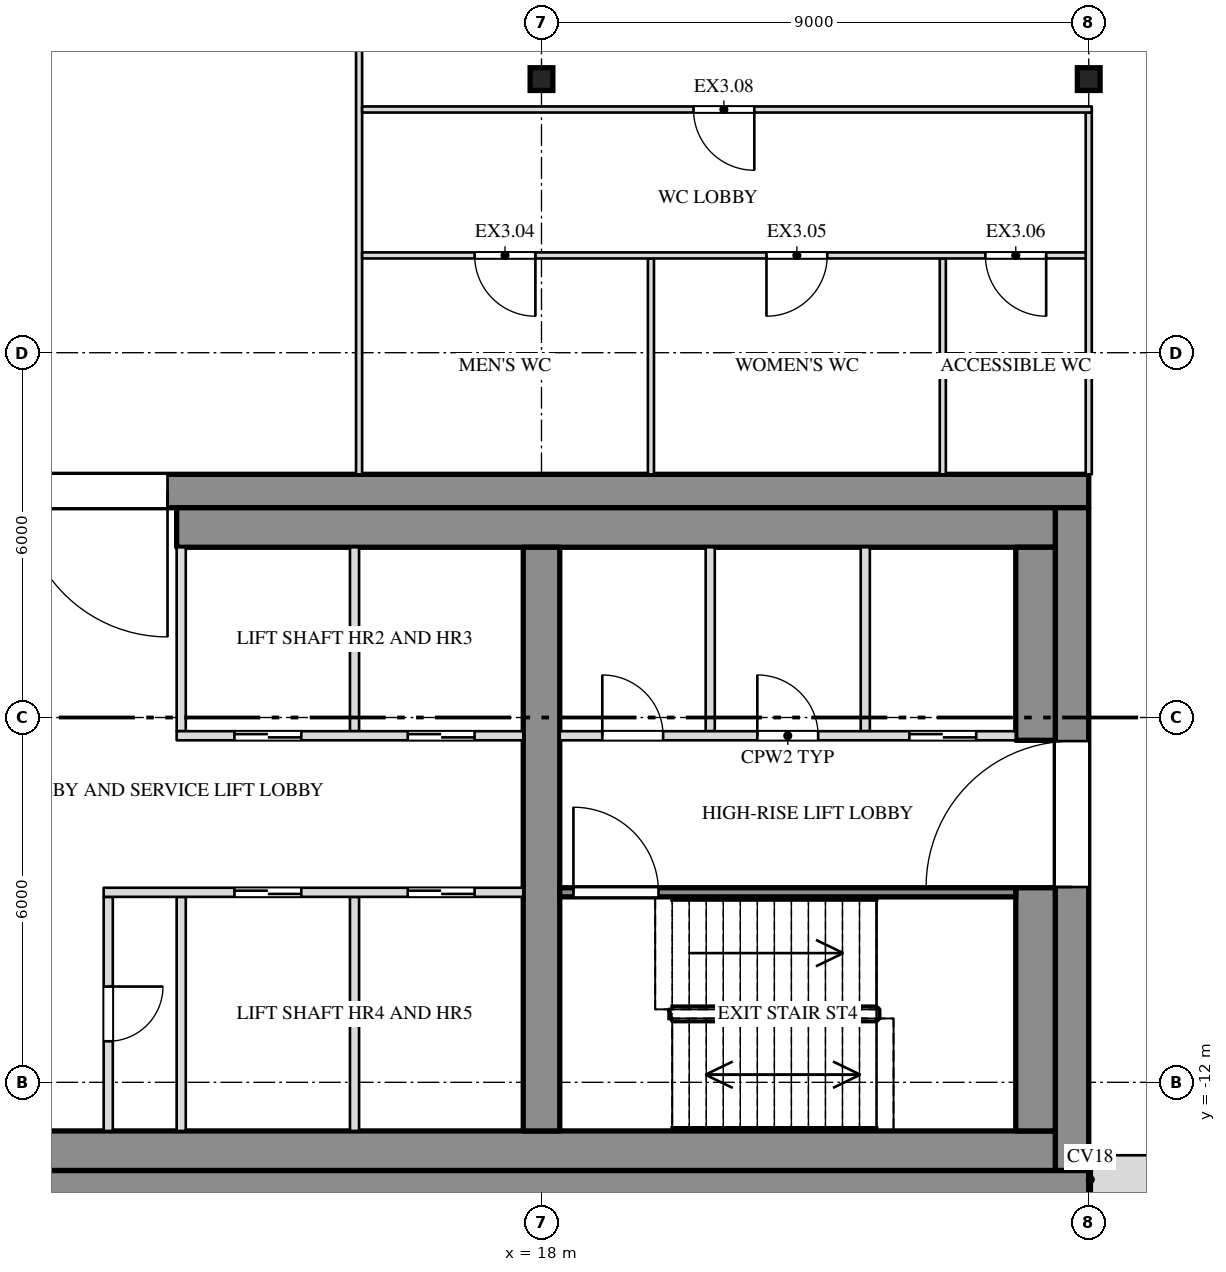
"""IFC4 building model, lengths in metres.
Left out: names, types, materials, properties, quantities, classifications, styles, units other than length and angle.
Written with IfcOpenShell. Run it as: python <this file> out.ifc"""

import sys

from ifc_helpers import new_model, si_unit, direction, frame, frame_2d, origin, origin_2d, place, context, subcontext, project, spatial, rectangle, i_section, extrude, element, fill, save


model = new_model("IFC4")
c1 = context("Model", 3, precision=1e-05, world=origin(), true_north=direction((0.0, 1.0)))
c2 = subcontext(c1, "Body", "Model", "MODEL_VIEW")
j1 = project(units=[si_unit("LENGTHUNIT", "METRE"), si_unit("PLANEANGLEUNIT", "RADIAN")], contexts=[c1])
p1 = place(None, origin())
s1 = spatial("IfcSite", under=j1, at=p1, CompositionType="ELEMENT")
p2 = place(p1, origin())
s2 = spatial("IfcBuilding", under=s1, at=p2, CompositionType="ELEMENT")
p3 = place(p2, frame((0.0, 0.0, 280.5)))
s3 = spatial("IfcBuildingStorey", under=s2, at=p3, CompositionType="ELEMENT", Elevation=280.5)
for number, where, z_axis, x_axis in (
    (1, (18.0, 4.5, 0.0), (0.0, 0.0, 1.0), (1.0, 0.0, 0.0)),
    (2, (27.0, 4.5, 0.0), (0.0, 0.0, 1.0), (1.0, 0.0, 0.0)),
):
    element("IfcColumn", number, at=place(p3, frame(where, z_axis=z_axis, x_axis=x_axis)), inside=s3, PredefinedType="COLUMN", context=c2, shape_type="SweptSolid", body=[
        extrude(i_section(OverallWidth=0.373, OverallDepth=0.373, WebThickness=0.016, FlangeThickness=0.026, at=origin_2d()), origin(), (0.0, 0.0, 1.0), 4.0),
    ])
p4 = place(p3, frame((-27.0, -2.275, 0.0), z_axis=(0.0, 0.0, 1.0), x_axis=(1.0, 0.0, 0.0)))
e3 = element("IfcWall", 3, at=p4, inside=s3, PredefinedType="SHEAR", context=c2, shape_type="SweptSolid", body=[
    extrude(rectangle(XDim=54.0, YDim=0.55, at=frame_2d((27.0, 0.0))), origin(), (0.0, 0.0, 1.0), 3.78),
])
p5 = place(p4, frame((15.15, 0.0, 0.0)))
e4 = element("IfcOpeningElement", 4, at=p5, cuts=e3, PredefinedType="OPENING", context=c2, shape_type="SweptSolid", body=[
    extrude(rectangle(XDim=2.4, YDim=2.1, at=frame_2d((1.2, 1.05))), frame((0.0, 0.287, 0.0), z_axis=(0.0, -1.0, 0.0), x_axis=(1.0, 0.0, 0.0)), (0.0, 0.0, 1.0), 0.574),
])
p6 = place(p4, frame((36.45, 0.0, 0.0)))
e5 = element("IfcOpeningElement", 5, at=p6, cuts=e3, PredefinedType="OPENING", context=c2, shape_type="SweptSolid", body=[
    extrude(rectangle(XDim=2.4, YDim=2.1, at=frame_2d((1.2, 1.05))), frame((0.0, 0.287, 0.0), z_axis=(0.0, -1.0, 0.0), x_axis=(1.0, 0.0, 0.0)), (0.0, 0.0, 1.0), 0.574),
])
p7 = place(p3, frame((-27.0, -13.725, 0.0), z_axis=(0.0, 0.0, 1.0), x_axis=(1.0, 0.0, 0.0)))
e6 = element("IfcWall", 6, at=p7, inside=s3, PredefinedType="SHEAR", context=c2, shape_type="SweptSolid", body=[
    extrude(rectangle(XDim=54.0, YDim=0.55, at=frame_2d((27.0, 0.0))), origin(), (0.0, 0.0, 1.0), 3.78),
])
p8 = place(p3, frame((26.725, -13.45, 0.0), z_axis=(0.0, 0.0, 1.0), x_axis=(0.0, 1.0, 0.0)))
e7 = element("IfcWall", 7, at=p8, inside=s3, PredefinedType="SHEAR", context=c2, shape_type="SweptSolid", body=[
    extrude(rectangle(XDim=10.9, YDim=0.55, at=frame_2d((5.45, 0.0))), origin(), (0.0, 0.0, 1.0), 3.78),
])
p9 = place(p8, frame((4.662, 0.0, 0.0)))
e8 = element("IfcOpeningElement", 8, at=p9, cuts=e7, PredefinedType="OPENING", context=c2, shape_type="SweptSolid", body=[
    extrude(rectangle(XDim=2.4, YDim=2.1, at=frame_2d((1.2, 1.05))), frame((0.0, 0.287, 0.0), z_axis=(0.0, -1.0, 0.0), x_axis=(1.0, 0.0, 0.0)), (0.0, 0.0, 1.0), 0.574),
])
p10 = place(p3, frame((12.0, -2.875, 0.0), z_axis=(0.0, 0.0, 1.0), x_axis=(1.0, 0.0, 0.0)))
e9 = element("IfcWall", 9, at=p10, inside=s3, PredefinedType="SHEAR", context=c2, shape_type="SweptSolid", body=[
    extrude(rectangle(XDim=14.45, YDim=0.65, at=frame_2d((7.225, 0.0))), origin(), (0.0, 0.0, 1.0), 3.78),
])
p11 = place(p3, frame((-26.45, -13.125, 0.0), z_axis=(0.0, 0.0, 1.0), x_axis=(1.0, 0.0, 0.0)))
e10 = element("IfcWall", 10, at=p11, inside=s3, PredefinedType="SHEAR", context=c2, shape_type="SweptSolid", body=[
    extrude(rectangle(XDim=52.9, YDim=0.65, at=frame_2d((26.45, 0.0))), origin(), (0.0, 0.0, 1.0), 3.78),
])
p12 = place(p3, frame((26.125, -12.8, 0.0), z_axis=(0.0, 0.0, 1.0), x_axis=(0.0, 1.0, 0.0)))
e11 = element("IfcWall", 11, at=p12, inside=s3, PredefinedType="SHEAR", context=c2, shape_type="SweptSolid", body=[
    extrude(rectangle(XDim=4.0, YDim=0.65, at=frame_2d((2.0, 0.0))), origin(), (0.0, 0.0, 1.0), 3.78),
])
p13 = place(p3, frame((26.125, -6.375, 0.0), z_axis=(0.0, 0.0, 1.0), x_axis=(0.0, 1.0, 0.0)))
e12 = element("IfcWall", 12, at=p13, inside=s3, PredefinedType="SHEAR", context=c2, shape_type="SweptSolid", body=[
    extrude(rectangle(XDim=3.175, YDim=0.65, at=frame_2d((1.587, 0.0))), origin(), (0.0, 0.0, 1.0), 3.78),
])
p14 = place(p3, frame((18.0, -12.8, 0.0), z_axis=(0.0, 0.0, 1.0), x_axis=(0.0, 1.0, 0.0)))
e13 = element("IfcWall", 13, at=p14, inside=s3, PredefinedType="SHEAR", context=c2, shape_type="SweptSolid", body=[
    extrude(rectangle(XDim=9.6, YDim=0.6, at=frame_2d((4.8, 0.0))), origin(), (0.0, 0.0, 1.0), 3.78),
])
p15 = place(p3, frame((15.0, -2.0, 0.0), z_axis=(0.0, 0.0, 1.0), x_axis=(0.0, 1.0, 0.0)))
e14 = element("IfcWall", 14, at=p15, inside=s3, PredefinedType="PARTITIONING", context=c2, shape_type="SweptSolid", body=[
    extrude(rectangle(XDim=38.2, YDim=0.1, at=frame_2d((19.1, 0.0))), origin(), (0.0, 0.0, 1.0), 3.78),
])
p16 = place(p15, frame((13.03, 0.0, 0.0)))
e15 = element("IfcOpeningElement", 15, at=p16, cuts=e14, PredefinedType="OPENING", context=c2, shape_type="SweptSolid", body=[
    extrude(rectangle(XDim=0.9, YDim=2.1, at=frame_2d((0.45, 1.05))), frame((0.0, 0.062, 0.0), z_axis=(0.0, -1.0, 0.0), x_axis=(1.0, 0.0, 0.0)), (0.0, 0.0, 1.0), 0.124),
])
p17 = place(p15, frame((22.77, 0.0, 0.0)))
e16 = element("IfcOpeningElement", 16, at=p17, cuts=e14, PredefinedType="OPENING", context=c2, shape_type="SweptSolid", body=[
    extrude(rectangle(XDim=0.9, YDim=2.1, at=frame_2d((0.45, 1.05))), frame((0.0, 0.062, 0.0), z_axis=(0.0, -1.0, 0.0), x_axis=(1.0, 0.0, 0.0)), (0.0, 0.0, 1.0), 0.124),
])
p18 = place(p15, frame((32.71, 0.0, 0.0)))
e17 = element("IfcOpeningElement", 17, at=p18, cuts=e14, PredefinedType="OPENING", context=c2, shape_type="SweptSolid", body=[
    extrude(rectangle(XDim=0.9, YDim=2.1, at=frame_2d((0.45, 1.05))), frame((0.0, 0.062, 0.0), z_axis=(0.0, -1.0, 0.0), x_axis=(1.0, 0.0, 0.0)), (0.0, 0.0, 1.0), 0.124),
])
for number, where, z_axis, x_axis in (
    (18, (19.8, -2.0, 0.0), (0.0, 0.0, 1.0), (0.0, 1.0, 0.0)),
    (19, (24.6, -2.0, 0.0), (0.0, 0.0, 1.0), (0.0, 1.0, 0.0)),
):
    element("IfcWall", number, at=place(p3, frame(where, z_axis=z_axis, x_axis=x_axis)), inside=s3, PredefinedType="PARTITIONING", context=c2, shape_type="SweptSolid", body=[
        extrude(rectangle(XDim=3.55, YDim=0.1, at=frame_2d((1.775, 0.0))), origin(), (0.0, 0.0, 1.0), 3.78),
    ])
p19 = place(p3, frame((27.0, -2.0, 0.0), z_axis=(0.0, 0.0, 1.0), x_axis=(0.0, 1.0, 0.0)))
e20 = element("IfcWall", 20, at=p19, inside=s3, PredefinedType="PARTITIONING", context=c2, shape_type="SweptSolid", body=[
    extrude(rectangle(XDim=5.95, YDim=0.1, at=frame_2d((2.975, 0.0))), origin(), (0.0, 0.0, 1.0), 2.848),
])
p20 = place(p3, frame((15.05, 1.6, 0.0), z_axis=(0.0, 0.0, 1.0), x_axis=(1.0, 0.0, 0.0)))
e21 = element("IfcWall", 21, at=p20, inside=s3, PredefinedType="PARTITIONING", context=c2, shape_type="SweptSolid", body=[
    extrude(rectangle(XDim=11.9, YDim=0.1, at=frame_2d((5.95, 0.0))), origin(), (0.0, 0.0, 1.0), 3.78),
])
p21 = place(p20, frame((1.85, 0.0, 0.0)))
e22 = element("IfcOpeningElement", 22, at=p21, cuts=e21, PredefinedType="OPENING", context=c2, shape_type="SweptSolid", body=[
    extrude(rectangle(XDim=1.0, YDim=2.1, at=frame_2d((0.5, 1.05))), frame((0.0, 0.062, 0.0), z_axis=(0.0, -1.0, 0.0), x_axis=(1.0, 0.0, 0.0)), (0.0, 0.0, 1.0), 0.124),
])
p22 = place(p20, frame((6.65, 0.0, 0.0)))
e23 = element("IfcOpeningElement", 23, at=p22, cuts=e21, PredefinedType="OPENING", context=c2, shape_type="SweptSolid", body=[
    extrude(rectangle(XDim=1.0, YDim=2.1, at=frame_2d((0.5, 1.05))), frame((0.0, 0.062, 0.0), z_axis=(0.0, -1.0, 0.0), x_axis=(1.0, 0.0, 0.0)), (0.0, 0.0, 1.0), 0.124),
])
p23 = place(p20, frame((10.25, 0.0, 0.0)))
e24 = element("IfcOpeningElement", 24, at=p23, cuts=e21, PredefinedType="OPENING", context=c2, shape_type="SweptSolid", body=[
    extrude(rectangle(XDim=1.0, YDim=2.1, at=frame_2d((0.5, 1.05))), frame((0.0, 0.062, 0.0), z_axis=(0.0, -1.0, 0.0), x_axis=(1.0, 0.0, 0.0)), (0.0, 0.0, 1.0), 0.124),
])
p24 = place(p3, frame((15.05, 4.0, 0.0), z_axis=(0.0, 0.0, 1.0), x_axis=(1.0, 0.0, 0.0)))
e25 = element("IfcWall", 25, at=p24, inside=s3, PredefinedType="PARTITIONING", context=c2, shape_type="SweptSolid", body=[
    extrude(rectangle(XDim=12.0, YDim=0.1, at=frame_2d((6.0, 0.0))), origin(), (0.0, 0.0, 1.0), 3.78),
])
p25 = place(p24, frame((5.45, 0.0, 0.0)))
e26 = element("IfcOpeningElement", 26, at=p25, cuts=e25, PredefinedType="OPENING", context=c2, shape_type="SweptSolid", body=[
    extrude(rectangle(XDim=1.0, YDim=2.1, at=frame_2d((0.5, 1.05))), frame((0.0, 0.062, 0.0), z_axis=(0.0, -1.0, 0.0), x_axis=(1.0, 0.0, 0.0)), (0.0, 0.0, 1.0), 0.124),
])
p26 = place(p3, frame((27.05, -13.6, 0.0), z_axis=(0.0, 0.0, 1.0), x_axis=(1.0, 0.0, 0.0)))
e27 = element("IfcWall", 27, at=p26, inside=s3, PredefinedType="SOLIDWALL", context=c2, shape_type="SweptSolid", body=[
    extrude(rectangle(XDim=2.897, YDim=0.8, at=frame_2d((1.449, 0.0))), origin(), (0.0, 0.0, 1.0), 3.78),
])
for number, where, z_axis, x_axis in (
    (28, (12.075, -6.225, 0.0), (0.0, 0.0, 1.0), (0.0, 1.0, 0.0)),
    (29, (14.925, -6.225, 0.0), (0.0, 0.0, 1.0), (0.0, 1.0, 0.0)),
    (30, (20.775, -6.225, 0.0), (0.0, 0.0, 1.0), (0.0, 1.0, 0.0)),
    (31, (23.325, -6.225, 0.0), (0.0, 0.0, 1.0), (0.0, 1.0, 0.0)),
):
    element("IfcWall", number, at=place(p3, frame(where, z_axis=z_axis, x_axis=x_axis)), inside=s3, PredefinedType="PARTITIONING", context=c2, shape_type="SweptSolid", body=[
        extrude(rectangle(XDim=3.025, YDim=0.15, at=frame_2d((1.513, 0.0))), origin(), (0.0, 0.0, 1.0), 3.78),
    ])
p27 = place(p3, frame((10.875, -12.8, 0.0), z_axis=(0.0, 0.0, 1.0), x_axis=(0.0, 1.0, 0.0)))
e32 = element("IfcWall", 32, at=p27, inside=s3, PredefinedType="PARTITIONING", context=c2, shape_type="SweptSolid", body=[
    extrude(rectangle(XDim=3.85, YDim=0.15, at=frame_2d((1.925, 0.0))), origin(), (0.0, 0.0, 1.0), 3.78),
])
p28 = place(p27, frame((1.475, 0.0, 0.0)))
e33 = element("IfcOpeningElement", 33, at=p28, cuts=e32, PredefinedType="OPENING", context=c2, shape_type="SweptSolid", body=[
    extrude(rectangle(XDim=0.9, YDim=2.1, at=frame_2d((0.45, 1.05))), frame((0.0, 0.087, 0.0), z_axis=(0.0, -1.0, 0.0), x_axis=(1.0, 0.0, 0.0)), (0.0, 0.0, 1.0), 0.174),
])
for number, where, z_axis, x_axis in (
    (34, (12.075, -12.8, 0.0), (0.0, 0.0, 1.0), (0.0, 1.0, 0.0)),
    (35, (14.925, -12.8, 0.0), (0.0, 0.0, 1.0), (0.0, 1.0, 0.0)),
):
    element("IfcWall", number, at=place(p3, frame(where, z_axis=z_axis, x_axis=x_axis)), inside=s3, PredefinedType="PARTITIONING", context=c2, shape_type="SweptSolid", body=[
        extrude(rectangle(XDim=3.85, YDim=0.15, at=frame_2d((1.925, 0.0))), origin(), (0.0, 0.0, 1.0), 3.78),
    ])
p29 = place(p3, frame((12.0, -6.3, 0.0), z_axis=(0.0, 0.0, 1.0), x_axis=(1.0, 0.0, 0.0)))
e36 = element("IfcWall", 36, at=p29, inside=s3, PredefinedType="PARTITIONING", context=c2, shape_type="SweptSolid", body=[
    extrude(rectangle(XDim=5.7, YDim=0.15, at=frame_2d((2.85, 0.0))), origin(), (0.0, 0.0, 1.0), 3.78),
])
p30 = place(p29, frame((0.95, 0.0, 0.0)))
e37 = element("IfcOpeningElement", 37, at=p30, cuts=e36, PredefinedType="OPENING", context=c2, shape_type="SweptSolid", body=[
    extrude(rectangle(XDim=1.1, YDim=2.1, at=frame_2d((0.55, 1.05))), frame((0.0, 0.087, 0.0), z_axis=(0.0, -1.0, 0.0), x_axis=(1.0, 0.0, 0.0)), (0.0, 0.0, 1.0), 0.174),
])
p31 = place(p29, frame((3.8, 0.0, 0.0)))
e38 = element("IfcOpeningElement", 38, at=p31, cuts=e36, PredefinedType="OPENING", context=c2, shape_type="SweptSolid", body=[
    extrude(rectangle(XDim=1.1, YDim=2.1, at=frame_2d((0.55, 1.05))), frame((0.0, 0.087, 0.0), z_axis=(0.0, -1.0, 0.0), x_axis=(1.0, 0.0, 0.0)), (0.0, 0.0, 1.0), 0.174),
])
p32 = place(p3, frame((18.3, -6.3, 0.0), z_axis=(0.0, 0.0, 1.0), x_axis=(1.0, 0.0, 0.0)))
e39 = element("IfcWall", 39, at=p32, inside=s3, PredefinedType="PARTITIONING", context=c2, shape_type="SweptSolid", body=[
    extrude(rectangle(XDim=7.5, YDim=0.15, at=frame_2d((3.75, 0.0))), origin(), (0.0, 0.0, 1.0), 3.78),
])
p33 = place(p32, frame((0.7, 0.0, 0.0)))
e40 = element("IfcOpeningElement", 40, at=p33, cuts=e39, PredefinedType="OPENING", context=c2, shape_type="SweptSolid", body=[
    extrude(rectangle(XDim=1.0, YDim=2.1, at=frame_2d((0.5, 1.05))), frame((0.0, 0.087, 0.0), z_axis=(0.0, -1.0, 0.0), x_axis=(1.0, 0.0, 0.0)), (0.0, 0.0, 1.0), 0.174),
])
p34 = place(p32, frame((3.25, 0.0, 0.0)))
e41 = element("IfcOpeningElement", 41, at=p34, cuts=e39, PredefinedType="OPENING", context=c2, shape_type="SweptSolid", body=[
    extrude(rectangle(XDim=1.0, YDim=2.1, at=frame_2d((0.5, 1.05))), frame((0.0, 0.087, 0.0), z_axis=(0.0, -1.0, 0.0), x_axis=(1.0, 0.0, 0.0)), (0.0, 0.0, 1.0), 0.174),
])
p35 = place(p32, frame((5.75, 0.0, 0.0)))
e42 = element("IfcOpeningElement", 42, at=p35, cuts=e39, PredefinedType="OPENING", context=c2, shape_type="SweptSolid", body=[
    extrude(rectangle(XDim=1.1, YDim=2.1, at=frame_2d((0.55, 1.05))), frame((0.0, 0.087, 0.0), z_axis=(0.0, -1.0, 0.0), x_axis=(1.0, 0.0, 0.0)), (0.0, 0.0, 1.0), 0.174),
])
p36 = place(p3, frame((10.8, -8.875, 0.0), z_axis=(0.0, 0.0, 1.0), x_axis=(1.0, 0.0, 0.0)))
e43 = element("IfcWall", 43, at=p36, inside=s3, PredefinedType="PARTITIONING", context=c2, shape_type="SweptSolid", body=[
    extrude(rectangle(XDim=6.9, YDim=0.15, at=frame_2d((3.45, 0.0))), origin(), (0.0, 0.0, 1.0), 3.78),
])
p37 = place(p36, frame((2.15, 0.0, 0.0)))
e44 = element("IfcOpeningElement", 44, at=p37, cuts=e43, PredefinedType="OPENING", context=c2, shape_type="SweptSolid", body=[
    extrude(rectangle(XDim=1.1, YDim=2.1, at=frame_2d((0.55, 1.05))), frame((0.0, 0.087, 0.0), z_axis=(0.0, -1.0, 0.0), x_axis=(1.0, 0.0, 0.0)), (0.0, 0.0, 1.0), 0.174),
])
p38 = place(p36, frame((5.0, 0.0, 0.0)))
e45 = element("IfcOpeningElement", 45, at=p38, cuts=e43, PredefinedType="OPENING", context=c2, shape_type="SweptSolid", body=[
    extrude(rectangle(XDim=1.1, YDim=2.1, at=frame_2d((0.55, 1.05))), frame((0.0, 0.087, 0.0), z_axis=(0.0, -1.0, 0.0), x_axis=(1.0, 0.0, 0.0)), (0.0, 0.0, 1.0), 0.174),
])
p39 = place(p3, frame((18.3, -8.875, 0.0), z_axis=(0.0, 0.0, 1.0), x_axis=(1.0, 0.0, 0.0)))
e46 = element("IfcWall", 46, at=p39, inside=s3, PredefinedType="SHEAR", context=c2, shape_type="SweptSolid", body=[
    extrude(rectangle(XDim=7.5, YDim=0.15, at=frame_2d((3.75, 0.0))), origin(), (0.0, 0.0, 1.0), 3.78),
])
p40 = place(p39, frame((0.225, 0.0, 0.0)))
e47 = element("IfcOpeningElement", 47, at=p40, cuts=e46, PredefinedType="OPENING", context=c2, shape_type="SweptSolid", body=[
    extrude(rectangle(XDim=1.4, YDim=2.1, at=frame_2d((0.7, 1.05))), frame((0.0, 0.087, 0.0), z_axis=(0.0, -1.0, 0.0), x_axis=(1.0, 0.0, 0.0)), (0.0, 0.0, 1.0), 0.174),
])
p41 = place(p21, origin())
e48 = element("IfcDoor", 48, at=p41, inside=s3, OperationType="SINGLE_SWING_LEFT", PredefinedType="DOOR", context=c2, shape_type="SweptSolid", body=[
    extrude(rectangle(XDim=1.0, YDim=2.1, at=frame_2d((0.5, 1.05))), frame((0.0, 0.025, 0.0), z_axis=(0.0, -1.0, 0.0), x_axis=(1.0, 0.0, 0.0)), (0.0, 0.0, 1.0), 0.05),
])
fill(e22, e48)
p42 = place(p22, origin())
e49 = element("IfcDoor", 49, at=p42, inside=s3, OperationType="SINGLE_SWING_RIGHT", PredefinedType="DOOR", context=c2, shape_type="SweptSolid", body=[
    extrude(rectangle(XDim=1.0, YDim=2.1, at=frame_2d((0.5, 1.05))), frame((0.0, 0.025, 0.0), z_axis=(0.0, -1.0, 0.0), x_axis=(1.0, 0.0, 0.0)), (0.0, 0.0, 1.0), 0.05),
])
fill(e23, e49)
p43 = place(p23, origin())
e50 = element("IfcDoor", 50, at=p43, inside=s3, OperationType="SINGLE_SWING_LEFT", PredefinedType="DOOR", context=c2, shape_type="SweptSolid", body=[
    extrude(rectangle(XDim=1.0, YDim=2.1, at=frame_2d((0.5, 1.05))), frame((0.0, 0.025, 0.0), z_axis=(0.0, -1.0, 0.0), x_axis=(1.0, 0.0, 0.0)), (0.0, 0.0, 1.0), 0.05),
])
fill(e24, e50)
p44 = place(p25, origin())
e51 = element("IfcDoor", 51, at=p44, inside=s3, OperationType="SINGLE_SWING_LEFT", PredefinedType="DOOR", context=c2, shape_type="SweptSolid", body=[
    extrude(rectangle(XDim=1.0, YDim=2.1, at=frame_2d((0.5, 1.05))), frame((0.0, 0.025, 0.0), z_axis=(0.0, -1.0, 0.0), x_axis=(1.0, 0.0, 0.0)), (0.0, 0.0, 1.0), 0.05),
])
fill(e26, e51)
p45 = place(p6, origin())
e52 = element("IfcDoor", 52, at=p45, inside=s3, OperationType="DOUBLE_DOOR_SINGLE_SWING", PredefinedType="DOOR", context=c2, shape_type="SweptSolid", body=[
    extrude(rectangle(XDim=2.4, YDim=2.1, at=frame_2d((1.2, 1.05))), frame((0.0, 0.025, 0.0), z_axis=(0.0, -1.0, 0.0), x_axis=(1.0, 0.0, 0.0)), (0.0, 0.0, 1.0), 0.05),
])
fill(e5, e52)
p46 = place(p28, origin())
e53 = element("IfcDoor", 53, at=p46, inside=s3, OperationType="SINGLE_SWING_LEFT", PredefinedType="DOOR", context=c2, shape_type="SweptSolid", body=[
    extrude(rectangle(XDim=0.9, YDim=2.1, at=frame_2d((0.45, 1.05))), frame((0.0, 0.025, 0.0), z_axis=(0.0, -1.0, 0.0), x_axis=(1.0, 0.0, 0.0)), (0.0, 0.0, 1.0), 0.05),
])
fill(e33, e53)
p47 = place(p37, origin())
e54 = element("IfcDoor", 54, at=p47, inside=s3, OperationType="SLIDING_TO_RIGHT", PredefinedType="DOOR", context=c2, shape_type="SweptSolid", body=[
    extrude(rectangle(XDim=1.1, YDim=2.1, at=frame_2d((0.55, 1.05))), frame((0.0, 0.025, 0.0), z_axis=(0.0, -1.0, 0.0), x_axis=(1.0, 0.0, 0.0)), (0.0, 0.0, 1.0), 0.05),
])
fill(e44, e54)
p48 = place(p30, origin())
e55 = element("IfcDoor", 55, at=p48, inside=s3, OperationType="SLIDING_TO_LEFT", PredefinedType="DOOR", context=c2, shape_type="SweptSolid", body=[
    extrude(rectangle(XDim=1.1, YDim=2.1, at=frame_2d((0.55, 1.05))), frame((0.0, 0.025, 0.0), z_axis=(0.0, -1.0, 0.0), x_axis=(1.0, 0.0, 0.0)), (0.0, 0.0, 1.0), 0.05),
])
fill(e37, e55)
p49 = place(p38, origin())
e56 = element("IfcDoor", 56, at=p49, inside=s3, OperationType="SLIDING_TO_RIGHT", PredefinedType="DOOR", context=c2, shape_type="SweptSolid", body=[
    extrude(rectangle(XDim=1.1, YDim=2.1, at=frame_2d((0.55, 1.05))), frame((0.0, 0.025, 0.0), z_axis=(0.0, -1.0, 0.0), x_axis=(1.0, 0.0, 0.0)), (0.0, 0.0, 1.0), 0.05),
])
fill(e45, e56)
p50 = place(p31, origin())
e57 = element("IfcDoor", 57, at=p50, inside=s3, OperationType="SLIDING_TO_LEFT", PredefinedType="DOOR", context=c2, shape_type="SweptSolid", body=[
    extrude(rectangle(XDim=1.1, YDim=2.1, at=frame_2d((0.55, 1.05))), frame((0.0, 0.025, 0.0), z_axis=(0.0, -1.0, 0.0), x_axis=(1.0, 0.0, 0.0)), (0.0, 0.0, 1.0), 0.05),
])
fill(e38, e57)
p51 = place(p40, origin())
e58 = element("IfcDoor", 58, at=p51, inside=s3, OperationType="DOUBLE_DOOR_SINGLE_SWING", PredefinedType="DOOR", context=c2, shape_type="SweptSolid", body=[
    extrude(rectangle(XDim=1.4, YDim=2.1, at=frame_2d((0.7, 1.05))), frame((0.0, 0.025, 0.0), z_axis=(0.0, -1.0, 0.0), x_axis=(1.0, 0.0, 0.0)), (0.0, 0.0, 1.0), 0.05),
])
fill(e47, e58)
p52 = place(p33, origin())
e59 = element("IfcDoor", 59, at=p52, inside=s3, OperationType="SINGLE_SWING_LEFT", PredefinedType="DOOR", context=c2, shape_type="SweptSolid", body=[
    extrude(rectangle(XDim=1.0, YDim=2.1, at=frame_2d((0.5, 1.05))), frame((0.0, 0.025, 0.0), z_axis=(0.0, -1.0, 0.0), x_axis=(1.0, 0.0, 0.0)), (0.0, 0.0, 1.0), 0.05),
])
fill(e40, e59)
p53 = place(p34, origin())
e60 = element("IfcDoor", 60, at=p53, inside=s3, OperationType="SINGLE_SWING_LEFT", PredefinedType="DOOR", context=c2, shape_type="SweptSolid", body=[
    extrude(rectangle(XDim=1.0, YDim=2.1, at=frame_2d((0.5, 1.05))), frame((0.0, 0.025, 0.0), z_axis=(0.0, -1.0, 0.0), x_axis=(1.0, 0.0, 0.0)), (0.0, 0.0, 1.0), 0.05),
])
fill(e41, e60)
p54 = place(p35, origin())
e61 = element("IfcDoor", 61, at=p54, inside=s3, OperationType="SLIDING_TO_LEFT", PredefinedType="DOOR", context=c2, shape_type="SweptSolid", body=[
    extrude(rectangle(XDim=1.1, YDim=2.1, at=frame_2d((0.55, 1.05))), frame((0.0, 0.025, 0.0), z_axis=(0.0, -1.0, 0.0), x_axis=(1.0, 0.0, 0.0)), (0.0, 0.0, 1.0), 0.05),
])
fill(e42, e61)
p55 = place(p9, origin())
e62 = element("IfcDoor", 62, at=p55, inside=s3, OperationType="DOUBLE_DOOR_SINGLE_SWING", PredefinedType="DOOR", context=c2, shape_type="SweptSolid", body=[
    extrude(rectangle(XDim=2.4, YDim=2.1, at=frame_2d((1.2, 1.05))), frame((0.0, 0.025, 0.0), z_axis=(0.0, -1.0, 0.0), x_axis=(1.0, 0.0, 0.0)), (0.0, 0.0, 1.0), 0.05),
])
fill(e8, e62)
save(model, sys.argv[1])
